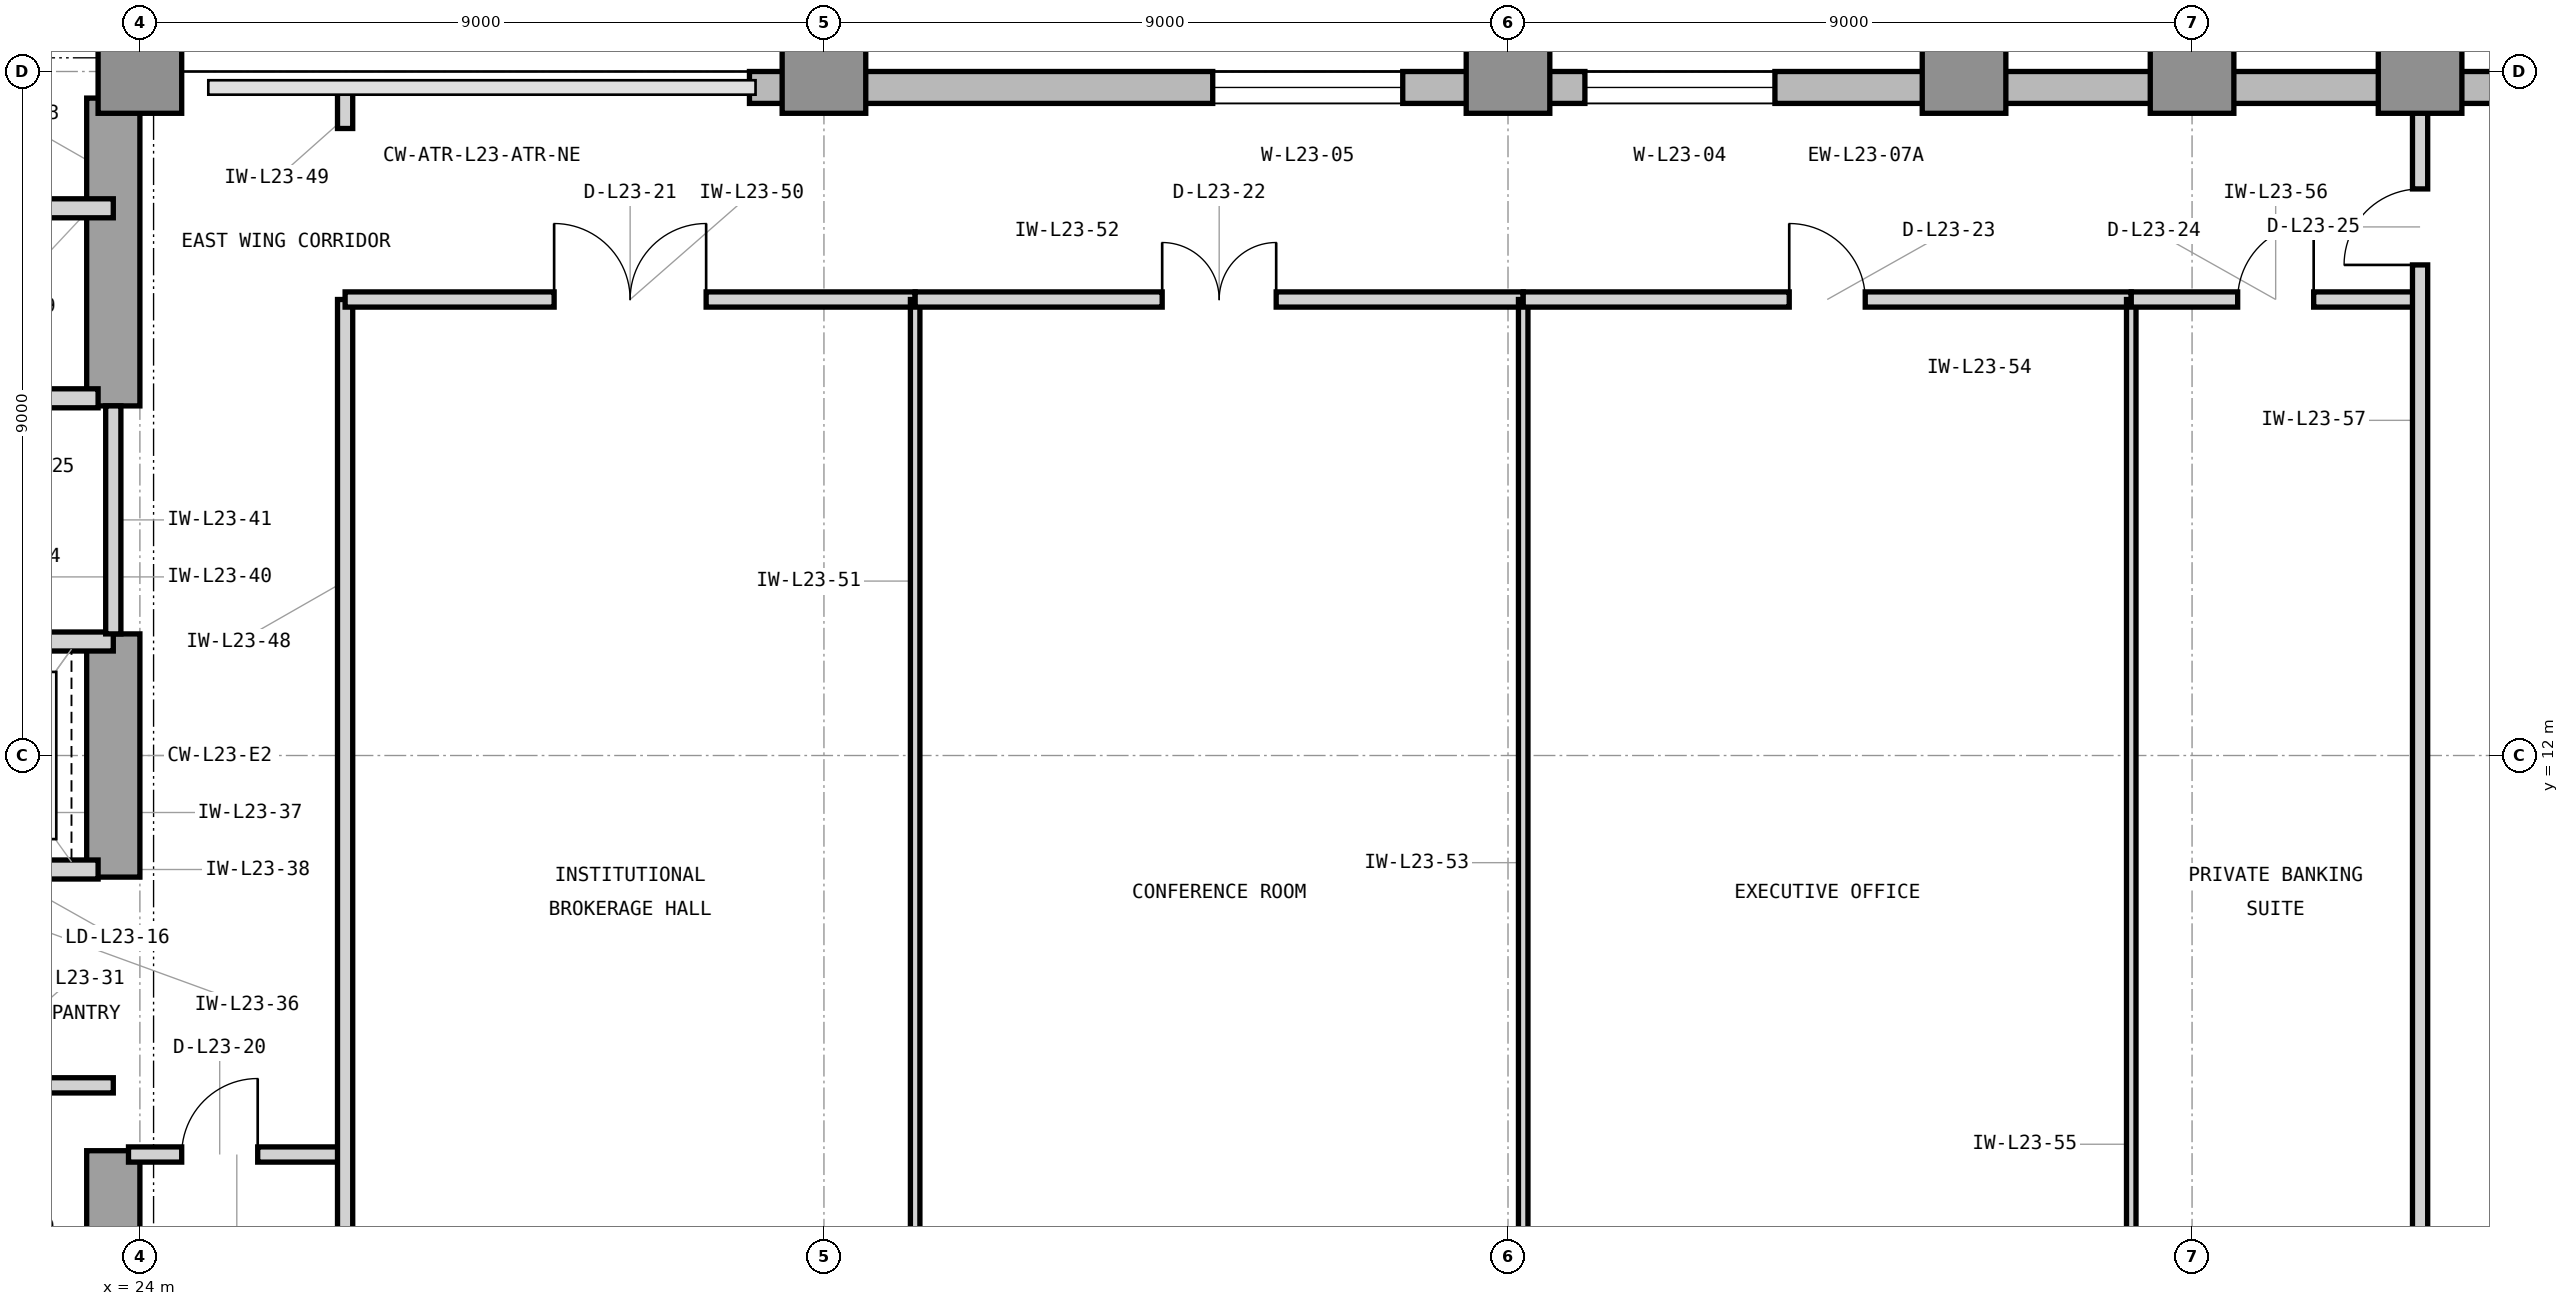
"""IFC4 building model, lengths in metres.
Left out: names, types, materials, properties, quantities, classifications, styles, units other than length and angle.
Written with IfcOpenShell. Run it as: python <this file> out.ifc"""

import sys

from ifc_helpers import new_model, si_unit, direction, frame, frame_2d, origin, origin_2d, place, context, subcontext, project, spatial, rectangle, extrude, element, fill, save


model = new_model("IFC4")
c1 = context("Model", 3, precision=1e-05, world=origin(), true_north=direction((0.0, 1.0)))
c2 = subcontext(c1, "Body", "Model", "MODEL_VIEW")
j1 = project(units=[si_unit("LENGTHUNIT", "METRE"), si_unit("PLANEANGLEUNIT", "RADIAN")], contexts=[c1])
p1 = place(None, origin())
s1 = spatial("IfcSite", under=j1, at=p1, CompositionType="ELEMENT")
p2 = place(p1, origin())
s2 = spatial("IfcBuilding", under=s1, at=p2, CompositionType="ELEMENT")
p3 = place(p2, frame((0.0, 0.0, 101.1)))
s3 = spatial("IfcBuildingStorey", under=s2, at=p3, CompositionType="ELEMENT", Elevation=101.1)
p4 = place(p3, frame((23.65, 3.7, 0.0), z_axis=(0.0, 0.0, 1.0), x_axis=(0.0, 1.0, 0.0)))
e1 = element("IfcWall", 1, at=p4, inside=s3, PredefinedType="SHEAR", context=c2, shape_type="SweptSolid", body=[
    extrude(rectangle(XDim=3.1, YDim=0.7, at=frame_2d((1.55, 0.0))), origin(), (0.0, 0.0, 1.0), 3.9),
])
p5 = place(p3, frame((23.65, 10.4, 0.0), z_axis=(0.0, 0.0, 1.0), x_axis=(0.0, 1.0, 0.0)))
e2 = element("IfcWall", 2, at=p5, inside=s3, PredefinedType="SHEAR", context=c2, shape_type="SweptSolid", body=[
    extrude(rectangle(XDim=3.2, YDim=0.7, at=frame_2d((1.6, 0.0))), origin(), (0.0, 0.0, 1.0), 3.9),
])
p6 = place(p3, frame((23.65, 16.6, 0.0), z_axis=(0.0, 0.0, 1.0), x_axis=(0.0, 1.0, 0.0)))
e3 = element("IfcWall", 3, at=p6, inside=s3, PredefinedType="SHEAR", context=c2, shape_type="SweptSolid", body=[
    extrude(rectangle(XDim=4.05, YDim=0.7, at=frame_2d((2.025, 0.0))), origin(), (0.0, 0.0, 1.0), 3.9),
])
for number, where, z_axis, x_axis in (
    (4, (24.0, 21.0, 0.0), (0.0, 0.0, 1.0), (1.0, 0.0, 0.0)),
    (5, (33.0, 21.0, 0.0), (0.0, 0.0, 1.0), (1.0, 0.0, 0.0)),
    (6, (42.0, 21.0, 0.0), (0.0, 0.0, 1.0), (1.0, 0.0, 0.0)),
    (7, (48.0, 21.0, 0.0), (0.0, 0.0, 1.0), (1.0, 0.0, 0.0)),
    (8, (51.0, 21.0, 0.0), (0.0, 0.0, 1.0), (1.0, 0.0, 0.0)),
    (9, (54.0, 21.0, 0.0), (0.0, 0.0, 1.0), (1.0, 0.0, 0.0)),
):
    element("IfcColumn", number, at=place(p3, frame(where, z_axis=z_axis, x_axis=x_axis)), inside=s3, PredefinedType="COLUMN", context=c2, shape_type="SweptSolid", body=[
        extrude(rectangle(XDim=1.1, YDim=1.1, at=origin_2d()), origin(), (0.0, 0.0, 1.0), 3.9),
    ])
p7 = place(p3, frame((61.4, 20.79, 0.0), z_axis=(0.0, 0.0, 1.0), x_axis=(-1.0, 0.0, 0.0)))
e10 = element("IfcWall", 10, at=p7, inside=s3, PredefinedType="STANDARD", context=c2, shape_type="SweptSolid", body=[
    extrude(rectangle(XDim=29.38, YDim=0.42, at=frame_2d((14.69, 0.0))), origin(), (0.0, 0.0, 1.0), 3.7),
])
p8 = place(p7, frame((15.888, 0.0, 0.85)))
e11 = element("IfcOpeningElement", 11, at=p8, cuts=e10, PredefinedType="OPENING", context=c2, shape_type="SweptSolid", body=[
    extrude(rectangle(XDim=2.5, YDim=2.25, at=frame_2d((1.25, 1.125))), frame((0.0, 0.22, 0.0), z_axis=(0.0, -1.0, 0.0), x_axis=(1.0, 0.0, 0.0)), (0.0, 0.0, 1.0), 0.44),
])
p9 = place(p7, frame((20.785, 0.0, 0.85)))
e12 = element("IfcOpeningElement", 12, at=p9, cuts=e10, PredefinedType="OPENING", context=c2, shape_type="SweptSolid", body=[
    extrude(rectangle(XDim=2.5, YDim=2.25, at=frame_2d((1.25, 1.125))), frame((0.0, 0.22, 0.0), z_axis=(0.0, -1.0, 0.0), x_axis=(1.0, 0.0, 0.0)), (0.0, 0.0, 1.0), 0.44),
])
p10 = place(p3, frame((23.79, 21.0, 0.0), z_axis=(0.0, 0.0, 1.0), x_axis=(0.0, 1.0, 0.0)))
e13 = element("IfcWall", 13, at=p10, inside=s3, PredefinedType="STANDARD", context=c2, shape_type="SweptSolid", body=[
    extrude(rectangle(XDim=25.4, YDim=0.42, at=frame_2d((12.7, 0.0))), origin(), (0.0, 0.0, 1.0), 3.7),
])
p11 = place(p10, frame((11.45, 0.0, 0.85)))
e14 = element("IfcOpeningElement", 14, at=p11, cuts=e13, PredefinedType="OPENING", context=c2, shape_type="SweptSolid", body=[
    extrude(rectangle(XDim=2.5, YDim=2.25, at=frame_2d((1.25, 1.125))), frame((0.0, 0.22, 0.0), z_axis=(0.0, -1.0, 0.0), x_axis=(1.0, 0.0, 0.0)), (0.0, 0.0, 1.0), 0.44),
])
p12 = place(p10, frame((18.866, 0.0, 0.85)))
e15 = element("IfcOpeningElement", 15, at=p12, cuts=e13, PredefinedType="OPENING", context=c2, shape_type="SweptSolid", body=[
    extrude(rectangle(XDim=1.2, YDim=2.25, at=frame_2d((0.6, 1.125))), frame((0.0, 0.22, 0.0), z_axis=(0.0, -1.0, 0.0), x_axis=(1.0, 0.0, 0.0)), (0.0, 0.0, 1.0), 0.44),
])
p13 = place(p3, frame((21.05, 16.7, 0.0), z_axis=(0.0, 0.0, 1.0), x_axis=(1.0, 0.0, 0.0)))
e16 = element("IfcWall", 16, at=p13, inside=s3, PredefinedType="PARTITIONING", context=c2, shape_type="SweptSolid", body=[
    extrude(rectangle(XDim=2.4, YDim=0.25, at=frame_2d((1.2, 0.0))), origin(), (0.0, 0.0, 1.0), 3.227),
])
p14 = place(p3, frame((16.45, 19.2, 0.0), z_axis=(0.0, 0.0, 1.0), x_axis=(1.0, 0.0, 0.0)))
e17 = element("IfcWall", 17, at=p14, inside=s3, PredefinedType="PARTITIONING", context=c2, shape_type="SweptSolid", body=[
    extrude(rectangle(XDim=7.2, YDim=0.25, at=frame_2d((3.6, 0.0))), origin(), (0.0, 0.0, 1.0), 3.69),
])
p15 = place(p3, frame((20.8, 7.66, 0.0), z_axis=(0.0, 0.0, 1.0), x_axis=(1.0, 0.0, 0.0)))
e18 = element("IfcWall", 18, at=p15, inside=s3, PredefinedType="PARTITIONING", context=c2, shape_type="SweptSolid", body=[
    extrude(rectangle(XDim=2.85, YDim=0.2, at=frame_2d((1.425, 0.0))), origin(), (0.0, 0.0, 1.0), 3.69),
])
p16 = place(p15, frame((0.95, 0.0, 0.0)))
e19 = element("IfcOpeningElement", 19, at=p16, cuts=e18, PredefinedType="OPENING", context=c2, shape_type="SweptSolid", body=[
    extrude(rectangle(XDim=0.95, YDim=2.1, at=frame_2d((0.475, 1.05))), frame((0.0, 0.11, 0.0), z_axis=(0.0, -1.0, 0.0), x_axis=(1.0, 0.0, 0.0)), (0.0, 0.0, 1.0), 0.22),
])
p17 = place(p3, frame((21.05, 10.5, 0.0), z_axis=(0.0, 0.0, 1.0), x_axis=(1.0, 0.0, 0.0)))
e20 = element("IfcWall", 20, at=p17, inside=s3, PredefinedType="PARTITIONING", context=c2, shape_type="SweptSolid", body=[
    extrude(rectangle(XDim=2.4, YDim=0.25, at=frame_2d((1.2, 0.0))), origin(), (0.0, 0.0, 1.0), 3.227),
])
p18 = place(p17, frame((0.48, 0.0, 0.0)))
e21 = element("IfcOpeningElement", 21, at=p18, cuts=e20, PredefinedType="OPENING", context=c2, shape_type="SweptSolid", body=[
    extrude(rectangle(XDim=1.15, YDim=2.25, at=frame_2d((0.575, 1.125))), frame((0.0, 0.135, 0.0), z_axis=(0.0, -1.0, 0.0), x_axis=(1.0, 0.0, 0.0)), (0.0, 0.0, 1.0), 0.27),
])
p19 = place(p3, frame((14.7, 13.5, 0.0), z_axis=(0.0, 0.0, 1.0), x_axis=(1.0, 0.0, 0.0)))
e22 = element("IfcWall", 22, at=p19, inside=s3, PredefinedType="PARTITIONING", context=c2, shape_type="SweptSolid", body=[
    extrude(rectangle(XDim=8.95, YDim=0.25, at=frame_2d((4.475, 0.0))), origin(), (0.0, 0.0, 1.0), 3.227),
])
p20 = place(p3, frame((23.65, 13.6, 0.0), z_axis=(0.0, 0.0, 1.0), x_axis=(0.0, 1.0, 0.0)))
e23 = element("IfcWall", 23, at=p20, inside=s3, PredefinedType="PARTITIONING", context=c2, shape_type="SweptSolid", body=[
    extrude(rectangle(XDim=3.0, YDim=0.2, at=frame_2d((1.5, 0.0))), origin(), (0.0, 0.0, 1.0), 3.69),
])
p21 = place(p3, frame((23.85, 6.75, 0.0), z_axis=(0.0, 0.0, 1.0), x_axis=(1.0, 0.0, 0.0)))
e24 = element("IfcWall", 24, at=p21, inside=s3, PredefinedType="PARTITIONING", context=c2, shape_type="SweptSolid", body=[
    extrude(rectangle(XDim=2.85, YDim=0.2, at=frame_2d((1.425, 0.0))), origin(), (0.0, 0.0, 1.0), 3.69),
])
p22 = place(p21, frame((0.7, 0.0, 0.0)))
e25 = element("IfcOpeningElement", 25, at=p22, cuts=e24, PredefinedType="OPENING", context=c2, shape_type="SweptSolid", body=[
    extrude(rectangle(XDim=1.0, YDim=2.15, at=frame_2d((0.5, 1.075))), frame((0.0, 0.11, 0.0), z_axis=(0.0, -1.0, 0.0), x_axis=(1.0, 0.0, 0.0)), (0.0, 0.0, 1.0), 0.22),
])
p23 = place(p3, frame((26.7, 3.18, 0.0), z_axis=(0.0, 0.0, 1.0), x_axis=(0.0, 1.0, 0.0)))
e26 = element("IfcWall", 26, at=p23, inside=s3, PredefinedType="PARTITIONING", context=c2, shape_type="SweptSolid", body=[
    extrude(rectangle(XDim=14.82, YDim=0.2, at=frame_2d((7.41, 0.0))), origin(), (0.0, 0.0, 1.0), 3.69),
])
p24 = place(p3, frame((26.7, 20.25, 0.0), z_axis=(0.0, 0.0, 1.0), x_axis=(0.0, 1.0, 0.0)))
e27 = element("IfcWall", 27, at=p24, inside=s3, PredefinedType="PARTITIONING", context=c2, shape_type="SweptSolid", body=[
    extrude(rectangle(XDim=0.57, YDim=0.2, at=frame_2d((0.285, 0.0))), origin(), (0.0, 0.0, 1.0), 3.69),
])
p25 = place(p3, frame((26.7, 18.0, 0.0), z_axis=(0.0, 0.0, 1.0), x_axis=(1.0, 0.0, 0.0)))
e28 = element("IfcWall", 28, at=p25, inside=s3, PredefinedType="PARTITIONING", context=c2, shape_type="SweptSolid", body=[
    extrude(rectangle(XDim=7.5, YDim=0.2, at=frame_2d((3.75, 0.0))), origin(), (0.0, 0.0, 1.0), 3.227),
])
p26 = place(p25, frame((2.75, 0.0, 0.0)))
e29 = element("IfcOpeningElement", 29, at=p26, cuts=e28, PredefinedType="OPENING", context=c2, shape_type="SweptSolid", body=[
    extrude(rectangle(XDim=2.0, YDim=2.5, at=frame_2d((1.0, 1.25))), frame((0.0, 0.11, 0.0), z_axis=(0.0, -1.0, 0.0), x_axis=(1.0, 0.0, 0.0)), (0.0, 0.0, 1.0), 0.22),
])
p27 = place(p3, frame((34.2, 3.18, 0.0), z_axis=(0.0, 0.0, 1.0), x_axis=(0.0, 1.0, 0.0)))
e30 = element("IfcWall", 30, at=p27, inside=s3, PredefinedType="PARTITIONING", context=c2, shape_type="SweptSolid", body=[
    extrude(rectangle(XDim=14.82, YDim=0.125, at=frame_2d((7.41, 0.0))), origin(), (0.0, 0.0, 1.0), 3.69),
])
p28 = place(p3, frame((34.2, 18.0, 0.0), z_axis=(0.0, 0.0, 1.0), x_axis=(1.0, 0.0, 0.0)))
e31 = element("IfcWall", 31, at=p28, inside=s3, PredefinedType="PARTITIONING", context=c2, shape_type="SweptSolid", body=[
    extrude(rectangle(XDim=8.0, YDim=0.2, at=frame_2d((4.0, 0.0))), origin(), (0.0, 0.0, 1.0), 3.227),
])
p29 = place(p28, frame((3.25, 0.0, 0.0)))
e32 = element("IfcOpeningElement", 32, at=p29, cuts=e31, PredefinedType="OPENING", context=c2, shape_type="SweptSolid", body=[
    extrude(rectangle(XDim=1.5, YDim=2.3, at=frame_2d((0.75, 1.15))), frame((0.0, 0.11, 0.0), z_axis=(0.0, -1.0, 0.0), x_axis=(1.0, 0.0, 0.0)), (0.0, 0.0, 1.0), 0.22),
])
p30 = place(p3, frame((42.2, 3.18, 0.0), z_axis=(0.0, 0.0, 1.0), x_axis=(0.0, 1.0, 0.0)))
e33 = element("IfcWall", 33, at=p30, inside=s3, PredefinedType="PARTITIONING", context=c2, shape_type="SweptSolid", body=[
    extrude(rectangle(XDim=14.82, YDim=0.125, at=frame_2d((7.41, 0.0))), origin(), (0.0, 0.0, 1.0), 3.69),
])
p31 = place(p3, frame((42.2, 18.0, 0.0), z_axis=(0.0, 0.0, 1.0), x_axis=(1.0, 0.0, 0.0)))
e34 = element("IfcWall", 34, at=p31, inside=s3, PredefinedType="PARTITIONING", context=c2, shape_type="SweptSolid", body=[
    extrude(rectangle(XDim=8.0, YDim=0.2, at=frame_2d((4.0, 0.0))), origin(), (0.0, 0.0, 1.0), 3.227),
])
p32 = place(p31, frame((3.5, 0.0, 0.0)))
e35 = element("IfcOpeningElement", 35, at=p32, cuts=e34, PredefinedType="OPENING", context=c2, shape_type="SweptSolid", body=[
    extrude(rectangle(XDim=1.0, YDim=2.15, at=frame_2d((0.5, 1.075))), frame((0.0, 0.11, 0.0), z_axis=(0.0, -1.0, 0.0), x_axis=(1.0, 0.0, 0.0)), (0.0, 0.0, 1.0), 0.22),
])
p33 = place(p3, frame((50.2, 3.18, 0.0), z_axis=(0.0, 0.0, 1.0), x_axis=(0.0, 1.0, 0.0)))
e36 = element("IfcWall", 36, at=p33, inside=s3, PredefinedType="PARTITIONING", context=c2, shape_type="SweptSolid", body=[
    extrude(rectangle(XDim=14.82, YDim=0.125, at=frame_2d((7.41, 0.0))), origin(), (0.0, 0.0, 1.0), 3.69),
])
p34 = place(p3, frame((50.2, 18.0, 0.0), z_axis=(0.0, 0.0, 1.0), x_axis=(1.0, 0.0, 0.0)))
e37 = element("IfcWall", 37, at=p34, inside=s3, PredefinedType="PARTITIONING", context=c2, shape_type="SweptSolid", body=[
    extrude(rectangle(XDim=3.8, YDim=0.2, at=frame_2d((1.9, 0.0))), origin(), (0.0, 0.0, 1.0), 3.227),
])
p35 = place(p34, frame((1.4, 0.0, 0.0)))
e38 = element("IfcOpeningElement", 38, at=p35, cuts=e37, PredefinedType="OPENING", context=c2, shape_type="SweptSolid", body=[
    extrude(rectangle(XDim=1.0, YDim=2.15, at=frame_2d((0.5, 1.075))), frame((0.0, 0.11, 0.0), z_axis=(0.0, -1.0, 0.0), x_axis=(1.0, 0.0, 0.0)), (0.0, 0.0, 1.0), 0.22),
])
p36 = place(p3, frame((54.0, 3.18, 0.0), z_axis=(0.0, 0.0, 1.0), x_axis=(0.0, 1.0, 0.0)))
e39 = element("IfcWall", 39, at=p36, inside=s3, PredefinedType="PARTITIONING", context=c2, shape_type="SweptSolid", body=[
    extrude(rectangle(XDim=17.64, YDim=0.2, at=frame_2d((8.82, 0.0))), origin(), (0.0, 0.0, 1.0), 2.917),
])
p37 = place(p36, frame((15.275, 0.0, 0.0)))
e40 = element("IfcOpeningElement", 40, at=p37, cuts=e39, PredefinedType="OPENING", context=c2, shape_type="SweptSolid", body=[
    extrude(rectangle(XDim=1.0, YDim=2.15, at=frame_2d((0.5, 1.075))), frame((0.0, 0.11, 0.0), z_axis=(0.0, -1.0, 0.0), x_axis=(1.0, 0.0, 0.0)), (0.0, 0.0, 1.0), 0.22),
])
p38 = place(p8, origin())
e41 = element("IfcWindow", 41, at=p38, inside=s3, PartitioningType="SINGLE_PANEL", PredefinedType="WINDOW", context=c2, shape_type="SweptSolid", body=[
    extrude(rectangle(XDim=2.5, YDim=2.25, at=frame_2d((1.25, 1.125))), frame((0.0, 0.11, 0.0), z_axis=(0.0, -1.0, 0.0), x_axis=(1.0, 0.0, 0.0)), (0.0, 0.0, 1.0), 0.06),
])
fill(e11, e41)
p39 = place(p9, origin())
e42 = element("IfcWindow", 42, at=p39, inside=s3, PartitioningType="SINGLE_PANEL", PredefinedType="WINDOW", context=c2, shape_type="SweptSolid", body=[
    extrude(rectangle(XDim=2.5, YDim=2.25, at=frame_2d((1.25, 1.125))), frame((0.0, 0.11, 0.0), z_axis=(0.0, -1.0, 0.0), x_axis=(1.0, 0.0, 0.0)), (0.0, 0.0, 1.0), 0.06),
])
fill(e12, e42)
p40 = place(p22, origin())
e43 = element("IfcDoor", 43, at=p40, inside=s3, OperationType="SINGLE_SWING_RIGHT", PredefinedType="DOOR", context=c2, shape_type="SweptSolid", body=[
    extrude(rectangle(XDim=1.0, YDim=2.15, at=frame_2d((0.5, 1.075))), frame((0.0, 0.025, 0.0), z_axis=(0.0, -1.0, 0.0), x_axis=(1.0, 0.0, 0.0)), (0.0, 0.0, 1.0), 0.05),
])
fill(e25, e43)
p41 = place(p26, origin())
e44 = element("IfcDoor", 44, at=p41, inside=s3, OperationType="DOUBLE_DOOR_SINGLE_SWING", PredefinedType="DOOR", context=c2, shape_type="SweptSolid", body=[
    extrude(rectangle(XDim=2.0, YDim=2.5, at=frame_2d((1.0, 1.25))), frame((0.0, 0.025, 0.0), z_axis=(0.0, -1.0, 0.0), x_axis=(1.0, 0.0, 0.0)), (0.0, 0.0, 1.0), 0.05),
])
fill(e29, e44)
p42 = place(p29, origin())
e45 = element("IfcDoor", 45, at=p42, inside=s3, OperationType="DOUBLE_DOOR_SINGLE_SWING", PredefinedType="DOOR", context=c2, shape_type="SweptSolid", body=[
    extrude(rectangle(XDim=1.5, YDim=2.3, at=frame_2d((0.75, 1.15))), frame((0.0, 0.025, 0.0), z_axis=(0.0, -1.0, 0.0), x_axis=(1.0, 0.0, 0.0)), (0.0, 0.0, 1.0), 0.05),
])
fill(e32, e45)
p43 = place(p32, origin())
e46 = element("IfcDoor", 46, at=p43, inside=s3, OperationType="SINGLE_SWING_LEFT", PredefinedType="DOOR", context=c2, shape_type="SweptSolid", body=[
    extrude(rectangle(XDim=1.0, YDim=2.15, at=frame_2d((0.5, 1.075))), frame((0.0, 0.025, 0.0), z_axis=(0.0, -1.0, 0.0), x_axis=(1.0, 0.0, 0.0)), (0.0, 0.0, 1.0), 0.05),
])
fill(e35, e46)
p44 = place(p35, origin())
e47 = element("IfcDoor", 47, at=p44, inside=s3, OperationType="SINGLE_SWING_RIGHT", PredefinedType="DOOR", context=c2, shape_type="SweptSolid", body=[
    extrude(rectangle(XDim=1.0, YDim=2.15, at=frame_2d((0.5, 1.075))), frame((0.0, 0.025, 0.0), z_axis=(0.0, -1.0, 0.0), x_axis=(1.0, 0.0, 0.0)), (0.0, 0.0, 1.0), 0.05),
])
fill(e38, e47)
p45 = place(p37, origin())
e48 = element("IfcDoor", 48, at=p45, inside=s3, OperationType="SINGLE_SWING_LEFT", PredefinedType="DOOR", context=c2, shape_type="SweptSolid", body=[
    extrude(rectangle(XDim=1.0, YDim=2.15, at=frame_2d((0.5, 1.075))), frame((0.0, 0.025, 0.0), z_axis=(0.0, -1.0, 0.0), x_axis=(1.0, 0.0, 0.0)), (0.0, 0.0, 1.0), 0.05),
])
fill(e40, e48)
save(model, sys.argv[1])
